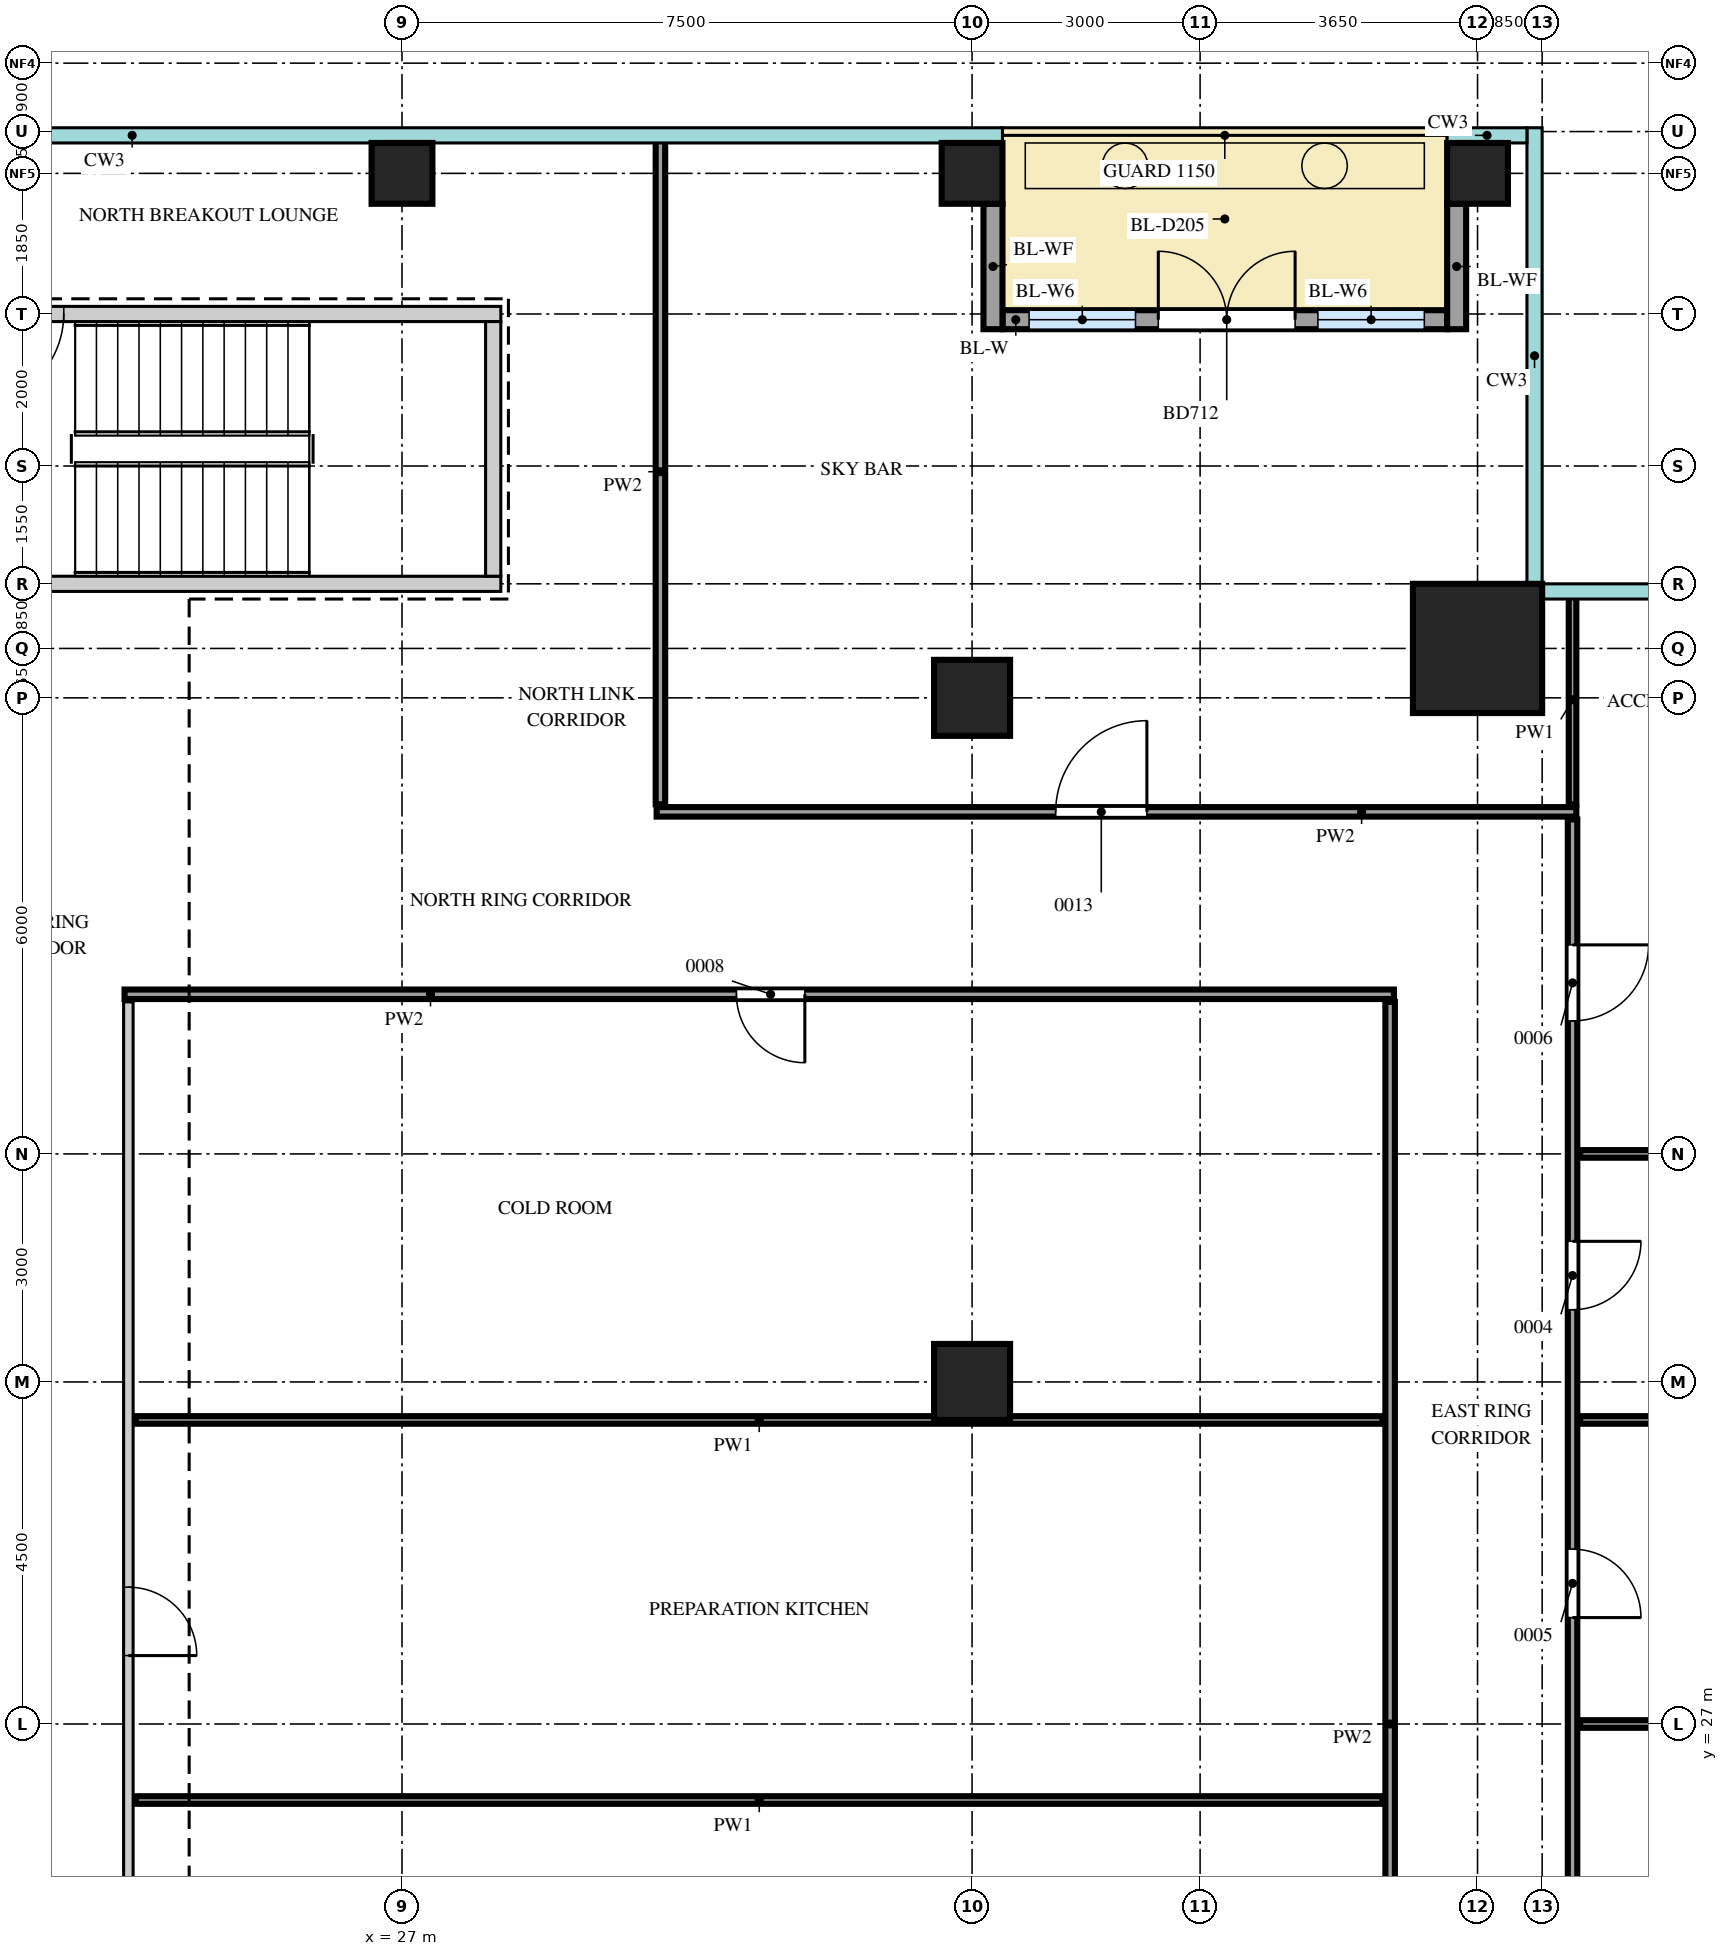
"""IFC4 building model, lengths in metres.
Left out: names, types, materials, properties, quantities, classifications, styles, units other than length and angle.
Written with IfcOpenShell. Run it as: python <this file> out.ifc"""

import sys

from ifc_helpers import new_model, si_unit, direction, frame, frame_2d, origin, origin_2d, place, context, subcontext, project, spatial, rectangle, extrude, source, transform, mapped, element, fill, save


model = new_model("IFC4")
c1 = context("Model", 3, precision=1e-05, world=origin(), true_north=direction((0.0, 1.0)))
c2 = subcontext(c1, "Body", "Model", "MODEL_VIEW")
j1 = project(units=[si_unit("LENGTHUNIT", "METRE"), si_unit("PLANEANGLEUNIT", "RADIAN")], contexts=[c1])
p1 = place(None, origin())
s1 = spatial("IfcSite", under=j1, at=p1, CompositionType="ELEMENT")
p2 = place(p1, origin())
s2 = spatial("IfcBuilding", under=s1, at=p2, CompositionType="ELEMENT")
p3 = place(p2, frame((0.0, 0.0, 314.2)))
s3 = spatial("IfcBuildingStorey", under=s2, at=p3, CompositionType="ELEMENT", Elevation=314.2)
m1 = source(origin(), c2, "Body", "SweptSolid", [
    extrude(rectangle(XDim=7.1, YDim=0.2, at=frame_2d((3.55, 0.0))), origin(), (0.0, 0.0, 1.0), 3.75),
])
p4 = place(p3, frame((21.2, 45.55, 0.0), z_axis=(0.0, 0.0, 1.0), x_axis=(1.0, 0.0, 0.0)))
e1 = element("IfcWall", 1, at=p4, inside=s3, PredefinedType="SHEAR", context=c2, shape_type="MappedRepresentation", body=[
    mapped(m1, transform((0.0, 0.0, 0.0))),
])
m2 = source(origin(), c2, "Body", "SweptSolid", [
    extrude(rectangle(XDim=1.2, YDim=2.1, at=frame_2d((0.6, 1.05))), frame((0.0, 0.11, 0.0), z_axis=(0.0, -1.0, 0.0), x_axis=(1.0, 0.0, 0.0)), (0.0, 0.0, 1.0), 0.22),
])
p5 = place(p4, frame((0.15, 0.0, 0.0)))
e2 = element("IfcOpeningElement", 2, at=p5, cuts=e1, PredefinedType="OPENING", context=c2, shape_type="MappedRepresentation", body=[
    mapped(m2, transform((0.0, 0.0, 0.0))),
])
p6 = place(p3, frame((21.2, 42.0, 0.0), z_axis=(0.0, 0.0, 1.0), x_axis=(1.0, 0.0, 0.0)))
e3 = element("IfcWall", 3, at=p6, inside=s3, PredefinedType="SHEAR", context=c2, shape_type="MappedRepresentation", body=[
    mapped(m1, transform((0.0, 0.0, 0.0))),
])
m3 = source(origin(), c2, "Body", "SweptSolid", [
    extrude(rectangle(XDim=3.35, YDim=0.2, at=frame_2d((1.675, 0.0))), origin(), (0.0, 0.0, 1.0), 3.75),
])
p7 = place(p3, frame((28.2, 42.1, 0.0), z_axis=(0.0, 0.0, 1.0), x_axis=(0.0, 1.0, 0.0)))
e4 = element("IfcWall", 4, at=p7, inside=s3, PredefinedType="SHEAR", context=c2, shape_type="MappedRepresentation", body=[
    mapped(m3, transform((0.0, 0.0, 0.0))),
])
m4 = source(origin(), c2, "Body", "SweptSolid", [
    extrude(rectangle(XDim=1.7, YDim=1.7, at=origin_2d()), origin(), (0.0, 0.0, 1.0), 3.75),
])
p8 = place(p3, frame((41.15, 41.15, 0.0), z_axis=(0.0, 0.0, 1.0), x_axis=(1.0, 0.0, 0.0)))
e5 = element("IfcColumn", 5, at=p8, inside=s3, PredefinedType="COLUMN", context=c2, shape_type="MappedRepresentation", body=[
    mapped(m4, transform((0.0, 0.0, 0.0))),
])
m5 = source(origin(), c2, "Body", "SweptSolid", [
    extrude(rectangle(XDim=0.8, YDim=0.8, at=origin_2d()), origin(), (0.0, 0.0, 1.0), 3.75),
])
for number, where, z_axis, x_axis in (
    (6, (27.0, 47.4, 0.0), (0.0, 0.0, 1.0), (1.0, 0.0, 0.0)),
    (7, (34.5, 47.4, 0.0), (0.0, 0.0, 1.0), (1.0, 0.0, 0.0)),
    (8, (41.15, 47.4, 0.0), (0.0, 0.0, 1.0), (1.0, 0.0, 0.0)),
):
    element("IfcColumn", number, at=place(p3, frame(where, z_axis=z_axis, x_axis=x_axis)), inside=s3, PredefinedType="COLUMN", context=c2, shape_type="MappedRepresentation", body=[
        mapped(m5, transform((0.0, 0.0, 0.0))),
    ])
m6 = source(origin(), c2, "Body", "SweptSolid", [
    extrude(rectangle(XDim=1.0, YDim=1.0, at=origin_2d()), origin(), (0.0, 0.0, 1.0), 3.75),
])
for number, where, z_axis, x_axis in (
    (9, (34.5, 31.5, 0.0), (0.0, 0.0, 1.0), (1.0, 0.0, 0.0)),
    (10, (34.5, 40.5, 0.0), (0.0, 0.0, 1.0), (1.0, 0.0, 0.0)),
):
    element("IfcColumn", number, at=place(p3, frame(where, z_axis=z_axis, x_axis=x_axis)), inside=s3, PredefinedType="COLUMN", context=c2, shape_type="MappedRepresentation", body=[
        mapped(m6, transform((0.0, 0.0, 0.0))),
    ])
m7 = source(origin(), c2, "Body", "SweptSolid", [
    extrude(rectangle(XDim=5.85, YDim=0.25, at=frame_2d((2.925, 0.0))), origin(), (0.0, 0.0, 1.0), 3.75),
])
p9 = place(p3, frame((34.9, 45.475, 0.0), z_axis=(0.0, 0.0, 1.0), x_axis=(1.0, 0.0, 0.0)))
e11 = element("IfcWall", 11, at=p9, inside=s3, PredefinedType="SOLIDWALL", context=c2, shape_type="MappedRepresentation", body=[
    mapped(m7, transform((0.0, 0.0, 0.0))),
])
m8 = source(origin(), c2, "Body", "SweptSolid", [
    extrude(rectangle(XDim=1.4, YDim=2.4, at=frame_2d((0.7, 1.2))), frame((0.0, 0.135, 0.0), z_axis=(0.0, -1.0, 0.0), x_axis=(1.0, 0.0, 0.0)), (0.0, 0.0, 1.0), 0.27),
])
p10 = place(p9, frame((0.35, 0.0, 0.0)))
e12 = element("IfcOpeningElement", 12, at=p10, cuts=e11, PredefinedType="OPENING", context=c2, shape_type="MappedRepresentation", body=[
    mapped(m8, transform((0.0, 0.0, 0.0))),
])
p11 = place(p9, frame((4.15, 0.0, 0.0)))
e13 = element("IfcOpeningElement", 13, at=p11, cuts=e11, PredefinedType="OPENING", context=c2, shape_type="MappedRepresentation", body=[
    mapped(m8, transform((0.0, 0.0, 0.0))),
])
m9 = source(origin(), c2, "Body", "SweptSolid", [
    extrude(rectangle(XDim=1.8, YDim=2.4, at=frame_2d((0.9, 1.2))), frame((0.0, 0.135, 0.0), z_axis=(0.0, -1.0, 0.0), x_axis=(1.0, 0.0, 0.0)), (0.0, 0.0, 1.0), 0.27),
])
p12 = place(p9, frame((2.05, 0.0, 0.0)))
e14 = element("IfcOpeningElement", 14, at=p12, cuts=e11, PredefinedType="OPENING", context=c2, shape_type="MappedRepresentation", body=[
    mapped(m9, transform((0.0, 0.0, 0.0))),
])
m10 = source(origin(), c2, "Body", "SweptSolid", [
    extrude(rectangle(XDim=1.65, YDim=0.25, at=frame_2d((0.825, 0.0))), origin(), (0.0, 0.0, 1.0), 3.45),
])
for number, where, z_axis, x_axis in (
    (15, (34.775, 47.0, 0.0), (0.0, 0.0, 1.0), (0.0, -1.0, 0.0)),
    (16, (40.875, 47.0, 0.0), (0.0, 0.0, 1.0), (0.0, -1.0, 0.0)),
):
    element("IfcWall", number, at=place(p3, frame(where, z_axis=z_axis, x_axis=x_axis)), inside=s3, PredefinedType="SOLIDWALL", context=c2, shape_type="MappedRepresentation", body=[
        mapped(m10, transform((0.0, 0.0, 0.0))),
    ])
m11 = source(origin(), c2, "Body", "SweptSolid", [
    extrude(rectangle(XDim=23.8, YDim=0.125, at=frame_2d((11.9, 0.0))), origin(), (0.0, 0.0, 1.0), 3.8),
])
p13 = place(p3, frame((42.4, 15.1, 0.0), z_axis=(0.0, 0.0, 1.0), x_axis=(0.0, 1.0, 0.0)))
e17 = element("IfcWall", 17, at=p13, inside=s3, PredefinedType="PARTITIONING", context=c2, shape_type="MappedRepresentation", body=[
    mapped(m11, transform((0.0, 0.0, 0.0))),
])
m12 = source(origin(), c2, "Body", "SweptSolid", [
    extrude(rectangle(XDim=1.2, YDim=2.1, at=frame_2d((0.6, 1.05))), frame((0.0, 0.073, 0.0), z_axis=(0.0, -1.0, 0.0), x_axis=(1.0, 0.0, 0.0)), (0.0, 0.0, 1.0), 0.145),
])
p14 = place(p13, frame((1.55, 0.0, 0.0)))
e18 = element("IfcOpeningElement", 18, at=p14, cuts=e17, PredefinedType="OPENING", context=c2, shape_type="MappedRepresentation", body=[
    mapped(m12, transform((0.0, 0.0, 0.0))),
])
p15 = place(p13, frame((7.55, 0.0, 0.0)))
e19 = element("IfcOpeningElement", 19, at=p15, cuts=e17, PredefinedType="OPENING", context=c2, shape_type="MappedRepresentation", body=[
    mapped(m12, transform((0.0, 0.0, 0.0))),
])
m13 = source(origin(), c2, "Body", "SweptSolid", [
    extrude(rectangle(XDim=0.9, YDim=2.1, at=frame_2d((0.45, 1.05))), frame((0.0, 0.073, 0.0), z_axis=(0.0, -1.0, 0.0), x_axis=(1.0, 0.0, 0.0)), (0.0, 0.0, 1.0), 0.145),
])
p16 = place(p13, frame((13.3, 0.0, 0.0)))
e20 = element("IfcOpeningElement", 20, at=p16, cuts=e17, PredefinedType="OPENING", context=c2, shape_type="MappedRepresentation", body=[
    mapped(m13, transform((0.0, 0.0, 0.0))),
])
p17 = place(p13, frame((17.35, 0.0, 0.0)))
e21 = element("IfcOpeningElement", 21, at=p17, cuts=e17, PredefinedType="OPENING", context=c2, shape_type="MappedRepresentation", body=[
    mapped(m13, transform((0.0, 0.0, 0.0))),
])
m14 = source(origin(), c2, "Body", "SweptSolid", [
    extrude(rectangle(XDim=1.0, YDim=2.1, at=frame_2d((0.5, 1.05))), frame((0.0, 0.073, 0.0), z_axis=(0.0, -1.0, 0.0), x_axis=(1.0, 0.0, 0.0)), (0.0, 0.0, 1.0), 0.145),
])
p18 = place(p13, frame((21.15, 0.0, 0.0)))
e22 = element("IfcOpeningElement", 22, at=p18, cuts=e17, PredefinedType="OPENING", context=c2, shape_type="MappedRepresentation", body=[
    mapped(m14, transform((0.0, 0.0, 0.0))),
])
m15 = source(origin(), c2, "Body", "SweptSolid", [
    extrude(rectangle(XDim=19.0, YDim=0.125, at=frame_2d((9.5, 0.0))), origin(), (0.0, 0.0, 1.0), 3.8),
])
p19 = place(p3, frame((23.4, 17.5, 0.0), z_axis=(0.0, 0.0, 1.0), x_axis=(0.0, 1.0, 0.0)))
e23 = element("IfcWall", 23, at=p19, inside=s3, PredefinedType="PARTITIONING", context=c2, shape_type="MappedRepresentation", body=[
    mapped(m15, transform((0.0, 0.0, 0.0))),
])
p20 = place(p19, frame((10.4, 0.0, 0.0)))
e24 = element("IfcOpeningElement", 24, at=p20, cuts=e23, PredefinedType="OPENING", context=c2, shape_type="MappedRepresentation", body=[
    mapped(m13, transform((0.0, 0.0, 0.0))),
])
p21 = place(p3, frame((40.0, 17.5, 0.0), z_axis=(0.0, 0.0, 1.0), x_axis=(0.0, 1.0, 0.0)))
e25 = element("IfcWall", 25, at=p21, inside=s3, PredefinedType="PARTITIONING", context=c2, shape_type="MappedRepresentation", body=[
    mapped(m15, transform((0.0, 0.0, 0.0))),
])
m16 = source(origin(), c2, "Body", "SweptSolid", [
    extrude(rectangle(XDim=16.4, YDim=0.1, at=frame_2d((8.2, 0.0))), origin(), (0.0, 0.0, 1.0), 3.8),
])
p22 = place(p3, frame((23.5, 26.0, 0.0), z_axis=(0.0, 0.0, 1.0), x_axis=(1.0, 0.0, 0.0)))
e26 = element("IfcWall", 26, at=p22, inside=s3, PredefinedType="PARTITIONING", context=c2, shape_type="MappedRepresentation", body=[
    mapped(m16, transform((0.0, 0.0, 0.0))),
])
m17 = source(origin(), c2, "Body", "SweptSolid", [
    extrude(rectangle(XDim=5.35, YDim=0.1, at=frame_2d((2.675, 0.0))), origin(), (0.0, 0.0, 1.0), 3.8),
])
p23 = place(p3, frame((42.5, 27.0, 0.0), z_axis=(0.0, 0.0, 1.0), x_axis=(1.0, 0.0, 0.0)))
e27 = element("IfcWall", 27, at=p23, inside=s3, PredefinedType="PARTITIONING", context=c2, shape_type="MappedRepresentation", body=[
    mapped(m17, transform((0.0, 0.0, 0.0))),
])
p24 = place(p3, frame((23.5, 31.0, 0.0), z_axis=(0.0, 0.0, 1.0), x_axis=(1.0, 0.0, 0.0)))
e28 = element("IfcWall", 28, at=p24, inside=s3, PredefinedType="PARTITIONING", context=c2, shape_type="MappedRepresentation", body=[
    mapped(m16, transform((0.0, 0.0, 0.0))),
])
for number, where, z_axis, x_axis in (
    (29, (42.5, 31.0, 0.0), (0.0, 0.0, 1.0), (1.0, 0.0, 0.0)),
    (30, (42.5, 34.5, 0.0), (0.0, 0.0, 1.0), (1.0, 0.0, 0.0)),
):
    element("IfcWall", number, at=place(p3, frame(where, z_axis=z_axis, x_axis=x_axis)), inside=s3, PredefinedType="PARTITIONING", context=c2, shape_type="MappedRepresentation", body=[
        mapped(m17, transform((0.0, 0.0, 0.0))),
    ])
m18 = source(origin(), c2, "Body", "SweptSolid", [
    extrude(rectangle(XDim=16.7, YDim=0.125, at=frame_2d((8.35, 0.0))), origin(), (0.0, 0.0, 1.0), 3.8),
])
p25 = place(p3, frame((23.35, 36.6, 0.0), z_axis=(0.0, 0.0, 1.0), x_axis=(1.0, 0.0, 0.0)))
e31 = element("IfcWall", 31, at=p25, inside=s3, PredefinedType="PARTITIONING", context=c2, shape_type="MappedRepresentation", body=[
    mapped(m18, transform((0.0, 0.0, 0.0))),
])
p26 = place(p25, frame((8.05, 0.0, 0.0)))
e32 = element("IfcOpeningElement", 32, at=p26, cuts=e31, PredefinedType="OPENING", context=c2, shape_type="MappedRepresentation", body=[
    mapped(m13, transform((0.0, 0.0, 0.0))),
])
m19 = source(origin(), c2, "Body", "SweptSolid", [
    extrude(rectangle(XDim=12.1, YDim=0.125, at=frame_2d((6.05, 0.0))), origin(), (0.0, 0.0, 1.0), 3.8),
])
p27 = place(p3, frame((30.35, 39.0, 0.0), z_axis=(0.0, 0.0, 1.0), x_axis=(1.0, 0.0, 0.0)))
e33 = element("IfcWall", 33, at=p27, inside=s3, PredefinedType="PARTITIONING", context=c2, shape_type="MappedRepresentation", body=[
    mapped(m19, transform((0.0, 0.0, 0.0))),
])
p28 = place(p27, frame((5.25, 0.0, 0.0)))
e34 = element("IfcOpeningElement", 34, at=p28, cuts=e33, PredefinedType="OPENING", context=c2, shape_type="MappedRepresentation", body=[
    mapped(m12, transform((0.0, 0.0, 0.0))),
])
m20 = source(origin(), c2, "Body", "SweptSolid", [
    extrude(rectangle(XDim=8.75, YDim=0.125, at=frame_2d((4.375, 0.0))), origin(), (0.0, 0.0, 1.0), 3.8),
])
p29 = place(p3, frame((30.4, 39.1, 0.0), z_axis=(0.0, 0.0, 1.0), x_axis=(0.0, 1.0, 0.0)))
e35 = element("IfcWall", 35, at=p29, inside=s3, PredefinedType="PARTITIONING", context=c2, shape_type="MappedRepresentation", body=[
    mapped(m20, transform((0.0, 0.0, 0.0))),
])
m21 = source(origin(), c2, "Body", "SweptSolid", [
    extrude(rectangle(XDim=2.75, YDim=0.1, at=frame_2d((1.375, 0.0))), origin(), (0.0, 0.0, 1.0), 3.8),
])
p30 = place(p3, frame((42.4, 39.1, 0.0), z_axis=(0.0, 0.0, 1.0), x_axis=(0.0, 1.0, 0.0)))
e36 = element("IfcWall", 36, at=p30, inside=s3, PredefinedType="PARTITIONING", context=c2, shape_type="MappedRepresentation", body=[
    mapped(m21, transform((0.0, 0.0, 0.0))),
])
m22 = source(origin(), c2, "Body", "SweptSolid", [
    extrude(rectangle(XDim=1.4, YDim=2.4, at=frame_2d((0.7, 1.2))), frame((0.0, 0.03, 0.0), z_axis=(0.0, -1.0, 0.0), x_axis=(1.0, 0.0, 0.0)), (0.0, 0.0, 1.0), 0.06),
])
p31 = place(p10, origin())
e37 = element("IfcWindow", 37, at=p31, inside=s3, PartitioningType="SINGLE_PANEL", PredefinedType="WINDOW", context=c2, shape_type="MappedRepresentation", body=[
    mapped(m22, transform((0.0, 0.0, 0.0))),
])
fill(e12, e37)
p32 = place(p11, origin())
e38 = element("IfcWindow", 38, at=p32, inside=s3, PartitioningType="SINGLE_PANEL", PredefinedType="WINDOW", context=c2, shape_type="MappedRepresentation", body=[
    mapped(m22, transform((0.0, 0.0, 0.0))),
])
fill(e13, e38)
m23 = source(origin(), c2, "Body", "SweptSolid", [
    extrude(rectangle(XDim=1.8, YDim=2.4, at=frame_2d((0.9, 1.2))), frame((0.0, 0.025, 0.0), z_axis=(0.0, -1.0, 0.0), x_axis=(1.0, 0.0, 0.0)), (0.0, 0.0, 1.0), 0.05),
])
p33 = place(p12, origin())
e39 = element("IfcDoor", 39, at=p33, inside=s3, OperationType="DOUBLE_DOOR_DOUBLE_SWING", PredefinedType="DOOR", context=c2, shape_type="MappedRepresentation", body=[
    mapped(m23, transform((0.0, 0.0, 0.0))),
])
fill(e14, e39)
m24 = source(origin(), c2, "Body", "SweptSolid", [
    extrude(rectangle(XDim=0.9, YDim=2.1, at=frame_2d((0.45, 1.05))), frame((0.0, 0.025, 0.0), z_axis=(0.0, -1.0, 0.0), x_axis=(1.0, 0.0, 0.0)), (0.0, 0.0, 1.0), 0.05),
])
p34 = place(p16, origin())
e40 = element("IfcDoor", 40, at=p34, inside=s3, OperationType="SINGLE_SWING_LEFT", PredefinedType="DOOR", context=c2, shape_type="MappedRepresentation", body=[
    mapped(m24, transform((0.0, 0.0, 0.0))),
])
fill(e20, e40)
p35 = place(p17, origin())
e41 = element("IfcDoor", 41, at=p35, inside=s3, OperationType="SINGLE_SWING_RIGHT", PredefinedType="DOOR", context=c2, shape_type="MappedRepresentation", body=[
    mapped(m24, transform((0.0, 0.0, 0.0))),
])
fill(e21, e41)
m25 = source(origin(), c2, "Body", "SweptSolid", [
    extrude(rectangle(XDim=1.0, YDim=2.1, at=frame_2d((0.5, 1.05))), frame((0.0, 0.025, 0.0), z_axis=(0.0, -1.0, 0.0), x_axis=(1.0, 0.0, 0.0)), (0.0, 0.0, 1.0), 0.05),
])
p36 = place(p18, origin())
e42 = element("IfcDoor", 42, at=p36, inside=s3, OperationType="SINGLE_SWING_RIGHT", PredefinedType="DOOR", context=c2, shape_type="MappedRepresentation", body=[
    mapped(m25, transform((0.0, 0.0, 0.0))),
])
fill(e22, e42)
m26 = source(origin(), c2, "Body", "SweptSolid", [
    extrude(rectangle(XDim=1.2, YDim=2.1, at=frame_2d((0.6, 1.05))), frame((0.0, 0.025, 0.0), z_axis=(0.0, -1.0, 0.0), x_axis=(1.0, 0.0, 0.0)), (0.0, 0.0, 1.0), 0.05),
])
p37 = place(p28, origin())
e43 = element("IfcDoor", 43, at=p37, inside=s3, OperationType="SINGLE_SWING_LEFT", PredefinedType="DOOR", context=c2, shape_type="MappedRepresentation", body=[
    mapped(m26, transform((0.0, 0.0, 0.0))),
])
fill(e34, e43)
p38 = place(p20, origin())
e44 = element("IfcDoor", 44, at=p38, inside=s3, OperationType="SINGLE_SWING_LEFT", PredefinedType="DOOR", context=c2, shape_type="MappedRepresentation", body=[
    mapped(m24, transform((0.0, 0.0, 0.0))),
])
fill(e24, e44)
p39 = place(p26, origin())
e45 = element("IfcDoor", 45, at=p39, inside=s3, OperationType="SINGLE_SWING_RIGHT", PredefinedType="DOOR", context=c2, shape_type="MappedRepresentation", body=[
    mapped(m24, transform((0.0, 0.0, 0.0))),
])
fill(e32, e45)
p40 = place(p5, origin())
e46 = element("IfcDoor", 46, at=p40, inside=s3, OperationType="SINGLE_SWING_LEFT", PredefinedType="DOOR", context=c2, shape_type="MappedRepresentation", body=[
    mapped(m26, transform((0.0, 0.0, 0.0))),
])
fill(e2, e46)
save(model, sys.argv[1])
